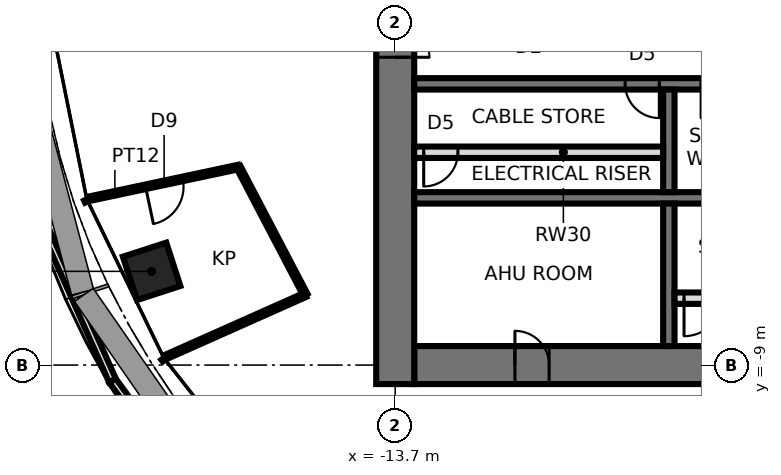
"""IFC4 building model, lengths in metres.
Left out: names, types, materials, properties, quantities, classifications, styles, units other than length and angle.
Written with IfcOpenShell. Run it as: python <this file> out.ifc"""

import sys

from ifc_helpers import new_model, si_unit, direction, frame, frame_2d, origin, origin_2d, place, context, subcontext, project, spatial, rectangle, extrude, element, fill, save


model = new_model("IFC4")
c1 = context("Model", 3, precision=1e-05, world=origin(), true_north=direction((0.0, 1.0)))
c2 = subcontext(c1, "Body", "Model", "MODEL_VIEW")
j1 = project(units=[si_unit("LENGTHUNIT", "METRE"), si_unit("PLANEANGLEUNIT", "RADIAN")], contexts=[c1])
p1 = place(None, origin())
s1 = spatial("IfcSite", under=j1, at=p1, CompositionType="ELEMENT")
p2 = place(p1, origin())
s2 = spatial("IfcBuilding", under=s1, at=p2, CompositionType="ELEMENT")
p3 = place(p2, frame((0.0, 0.0, 251.8)))
s3 = spatial("IfcBuildingStorey", under=s2, at=p3, CompositionType="ELEMENT", Elevation=251.8)
p4 = place(p3, frame((-20.109, -6.534, 0.0), z_axis=(0.0, 0.0, 1.0), x_axis=(-0.951056516295, -0.309016994375, 0.0)))
e1 = element("IfcColumn", 1, at=p4, inside=s3, PredefinedType="COLUMN", context=c2, shape_type="SweptSolid", body=[
    extrude(rectangle(XDim=1.2, YDim=1.2, at=origin_2d()), origin(), (0.0, 0.0, 1.0), 4.2),
])
p5 = place(p3, frame((-13.2, -9.0, 0.0), z_axis=(0.0, 0.0, 1.0), x_axis=(1.0, 0.0, 0.0)))
e2 = element("IfcWall", 2, at=p5, inside=s3, PredefinedType="SHEAR", context=c2, shape_type="SweptSolid", body=[
    extrude(rectangle(XDim=26.4, YDim=1.0, at=frame_2d((13.2, 0.0))), origin(), (0.0, 0.0, 1.0), 4.2),
])
p6 = place(p5, frame((2.65, 0.0, 0.0)))
e3 = element("IfcOpeningElement", 3, at=p6, cuts=e2, PredefinedType="OPENING", context=c2, shape_type="SweptSolid", body=[
    extrude(rectangle(XDim=0.9, YDim=2.1, at=frame_2d((0.45, 1.05))), frame((0.0, 0.51, 0.0), z_axis=(0.0, -1.0, 0.0), x_axis=(1.0, 0.0, 0.0)), (0.0, 0.0, 1.0), 1.02),
])
p7 = place(p5, frame((9.5, 0.0, 0.0)))
e4 = element("IfcOpeningElement", 4, at=p7, cuts=e2, PredefinedType="OPENING", context=c2, shape_type="SweptSolid", body=[
    extrude(rectangle(XDim=0.9, YDim=2.1, at=frame_2d((0.45, 1.05))), frame((0.0, 0.51, 0.0), z_axis=(0.0, -1.0, 0.0), x_axis=(1.0, 0.0, 0.0)), (0.0, 0.0, 1.0), 1.02),
])
p8 = place(p5, frame((16.0, 0.0, 0.0)))
e5 = element("IfcOpeningElement", 5, at=p8, cuts=e2, PredefinedType="OPENING", context=c2, shape_type="SweptSolid", body=[
    extrude(rectangle(XDim=0.9, YDim=2.1, at=frame_2d((0.45, 1.05))), frame((0.0, 0.51, 0.0), z_axis=(0.0, -1.0, 0.0), x_axis=(1.0, 0.0, 0.0)), (0.0, 0.0, 1.0), 1.02),
])
p9 = place(p5, frame((22.85, 0.0, 0.0)))
e6 = element("IfcOpeningElement", 6, at=p9, cuts=e2, PredefinedType="OPENING", context=c2, shape_type="SweptSolid", body=[
    extrude(rectangle(XDim=0.9, YDim=2.1, at=frame_2d((0.45, 1.05))), frame((0.0, 0.51, 0.0), z_axis=(0.0, -1.0, 0.0), x_axis=(1.0, 0.0, 0.0)), (0.0, 0.0, 1.0), 1.02),
])
p10 = place(p3, frame((-13.7, 9.5, 0.0), z_axis=(0.0, 0.0, 1.0), x_axis=(0.0, -1.0, 0.0)))
e7 = element("IfcWall", 7, at=p10, inside=s3, PredefinedType="SHEAR", context=c2, shape_type="SweptSolid", body=[
    extrude(rectangle(XDim=19.0, YDim=1.0, at=frame_2d((9.5, 0.0))), origin(), (0.0, 0.0, 1.0), 4.2),
])
p11 = place(p10, frame((8.6, 0.0, 0.0)))
e8 = element("IfcOpeningElement", 8, at=p11, cuts=e7, PredefinedType="OPENING", context=c2, shape_type="SweptSolid", body=[
    extrude(rectangle(XDim=1.8, YDim=2.4, at=frame_2d((0.9, 1.2))), frame((0.0, 0.51, 0.0), z_axis=(0.0, -1.0, 0.0), x_axis=(1.0, 0.0, 0.0)), (0.0, 0.0, 1.0), 1.02),
])
p12 = place(p3, frame((-13.2, -1.6, 0.0), z_axis=(0.0, 0.0, 1.0), x_axis=(1.0, 0.0, 0.0)))
e9 = element("IfcWall", 9, at=p12, inside=s3, PredefinedType="SHEAR", context=c2, shape_type="SweptSolid", body=[
    extrude(rectangle(XDim=26.4, YDim=0.3, at=frame_2d((13.2, 0.0))), origin(), (0.0, 0.0, 1.0), 4.2),
])
p13 = place(p12, frame((25.15, 0.0, 0.0)))
e10 = element("IfcOpeningElement", 10, at=p13, cuts=e9, PredefinedType="OPENING", context=c2, shape_type="SweptSolid", body=[
    extrude(rectangle(XDim=1.0, YDim=2.1, at=frame_2d((0.5, 1.05))), frame((0.0, 0.16, 0.0), z_axis=(0.0, -1.0, 0.0), x_axis=(1.0, 0.0, 0.0)), (0.0, 0.0, 1.0), 0.32),
])
p14 = place(p12, frame((7.55, 0.0, 0.0)))
e11 = element("IfcOpeningElement", 11, at=p14, cuts=e9, PredefinedType="OPENING", context=c2, shape_type="SweptSolid", body=[
    extrude(rectangle(XDim=0.9, YDim=2.1, at=frame_2d((0.45, 1.05))), frame((0.0, 0.16, 0.0), z_axis=(0.0, -1.0, 0.0), x_axis=(1.0, 0.0, 0.0)), (0.0, 0.0, 1.0), 0.32),
])
p15 = place(p12, frame((9.55, 0.0, 0.0)))
e12 = element("IfcOpeningElement", 12, at=p15, cuts=e9, PredefinedType="OPENING", context=c2, shape_type="SweptSolid", body=[
    extrude(rectangle(XDim=0.9, YDim=2.1, at=frame_2d((0.45, 1.05))), frame((0.0, 0.16, 0.0), z_axis=(0.0, -1.0, 0.0), x_axis=(1.0, 0.0, 0.0)), (0.0, 0.0, 1.0), 0.32),
])
p16 = place(p12, frame((12.15, 0.0, 0.0)))
e13 = element("IfcOpeningElement", 13, at=p16, cuts=e9, PredefinedType="OPENING", context=c2, shape_type="SweptSolid", body=[
    extrude(rectangle(XDim=0.9, YDim=2.1, at=frame_2d((0.45, 1.05))), frame((0.0, 0.16, 0.0), z_axis=(0.0, -1.0, 0.0), x_axis=(1.0, 0.0, 0.0)), (0.0, 0.0, 1.0), 0.32),
])
p17 = place(p12, frame((15.25, 0.0, 0.0)))
e14 = element("IfcOpeningElement", 14, at=p17, cuts=e9, PredefinedType="OPENING", context=c2, shape_type="SweptSolid", body=[
    extrude(rectangle(XDim=1.1, YDim=2.3, at=frame_2d((0.55, 1.15))), frame((0.0, 0.16, 0.0), z_axis=(0.0, -1.0, 0.0), x_axis=(1.0, 0.0, 0.0)), (0.0, 0.0, 1.0), 0.32),
])
p18 = place(p12, frame((17.85, 0.0, 0.0)))
e15 = element("IfcOpeningElement", 15, at=p18, cuts=e9, PredefinedType="OPENING", context=c2, shape_type="SweptSolid", body=[
    extrude(rectangle(XDim=1.1, YDim=2.3, at=frame_2d((0.55, 1.15))), frame((0.0, 0.16, 0.0), z_axis=(0.0, -1.0, 0.0), x_axis=(1.0, 0.0, 0.0)), (0.0, 0.0, 1.0), 0.32),
])
p19 = place(p12, frame((5.55, 0.0, 0.0)))
e16 = element("IfcOpeningElement", 16, at=p19, cuts=e9, PredefinedType="OPENING", context=c2, shape_type="SweptSolid", body=[
    extrude(rectangle(XDim=0.9, YDim=2.1, at=frame_2d((0.45, 1.05))), frame((0.0, 0.16, 0.0), z_axis=(0.0, -1.0, 0.0), x_axis=(1.0, 0.0, 0.0)), (0.0, 0.0, 1.0), 0.32),
])
p20 = place(p3, frame((-13.2, -4.6, 0.0), z_axis=(0.0, 0.0, 1.0), x_axis=(1.0, 0.0, 0.0)))
e17 = element("IfcWall", 17, at=p20, inside=s3, PredefinedType="SHEAR", context=c2, shape_type="SweptSolid", body=[
    extrude(rectangle(XDim=26.4, YDim=0.3, at=frame_2d((13.2, 0.0))), origin(), (0.0, 0.0, 1.0), 4.2),
])
p21 = place(p3, frame((-6.5, -1.75, 0.0), z_axis=(0.0, 0.0, 1.0), x_axis=(0.0, -1.0, 0.0)))
e18 = element("IfcWall", 18, at=p21, inside=s3, PredefinedType="SHEAR", context=c2, shape_type="SweptSolid", body=[
    extrude(rectangle(XDim=2.7, YDim=0.3, at=frame_2d((1.35, 0.0))), origin(), (0.0, 0.0, 1.0), 4.2),
])
p22 = place(p3, frame((-6.5, -4.75, 0.0), z_axis=(0.0, 0.0, 1.0), x_axis=(0.0, -1.0, 0.0)))
e19 = element("IfcWall", 19, at=p22, inside=s3, PredefinedType="SHEAR", context=c2, shape_type="SweptSolid", body=[
    extrude(rectangle(XDim=3.75, YDim=0.3, at=frame_2d((1.875, 0.0))), origin(), (0.0, 0.0, 1.0), 4.2),
])
p23 = place(p3, frame((-23.138, -4.918, 0.0), z_axis=(0.0, 0.0, 1.0), x_axis=(0.406654252218, -0.913582135964, 0.0)))
e20 = element("IfcWall", 20, at=p23, inside=s3, PredefinedType="PARAPET", context=c2, shape_type="SweptSolid", body=[
    extrude(rectangle(XDim=4.918, YDim=0.2, at=frame_2d((2.459, 0.0))), origin(), (0.0, 0.0, 1.0), 1.1),
])
p24 = place(p3, frame((-21.138, -9.411, 0.0), z_axis=(0.0, 0.0, 1.0), x_axis=(0.590318108824, -0.807170694708, 0.0)))
e21 = element("IfcWall", 21, at=p24, inside=s3, PredefinedType="PARAPET", context=c2, shape_type="SweptSolid", body=[
    extrude(rectangle(XDim=4.811, YDim=0.2, at=frame_2d((2.405, 0.0))), origin(), (0.0, 0.0, 1.0), 1.1),
])
p25 = place(p3, frame((-6.35, -7.24, 0.0), z_axis=(0.0, 0.0, 1.0), x_axis=(1.0, 0.0, 0.0)))
e22 = element("IfcWall", 22, at=p25, inside=s3, PredefinedType="PARTITIONING", context=c2, shape_type="SweptSolid", body=[
    extrude(rectangle(XDim=6.2, YDim=0.3, at=frame_2d((3.1, 0.0))), origin(), (0.0, 0.0, 1.0), 4.04),
])
p26 = place(p25, frame((0.25, 0.0, 0.0)))
e23 = element("IfcOpeningElement", 23, at=p26, cuts=e22, PredefinedType="OPENING", context=c2, shape_type="SweptSolid", body=[
    extrude(rectangle(XDim=1.0, YDim=2.4, at=frame_2d((0.5, 1.2))), frame((0.0, 0.16, 0.0), z_axis=(0.0, -1.0, 0.0), x_axis=(1.0, 0.0, 0.0)), (0.0, 0.0, 1.0), 0.32),
])
p27 = place(p3, frame((-13.2, -3.4, 0.0), z_axis=(0.0, 0.0, 1.0), x_axis=(1.0, 0.0, 0.0)))
e24 = element("IfcWall", 24, at=p27, inside=s3, PredefinedType="SOLIDWALL", context=c2, shape_type="SweptSolid", body=[
    extrude(rectangle(XDim=6.55, YDim=0.3, at=frame_2d((3.275, 0.0))), origin(), (0.0, 0.0, 1.0), 4.04),
])
p28 = place(p27, frame((0.25, 0.0, 0.0)))
e25 = element("IfcOpeningElement", 25, at=p28, cuts=e24, PredefinedType="OPENING", context=c2, shape_type="SweptSolid", body=[
    extrude(rectangle(XDim=0.9, YDim=2.1, at=frame_2d((0.45, 1.05))), frame((0.0, 0.16, 0.0), z_axis=(0.0, -1.0, 0.0), x_axis=(1.0, 0.0, 0.0)), (0.0, 0.0, 1.0), 0.32),
])
p29 = place(p3, frame((-17.824, -3.789, 0.0), z_axis=(0.0, 0.0, 1.0), x_axis=(-0.978140543132, -0.207944891454, 0.0)))
e26 = element("IfcWall", 26, at=p29, inside=s3, PredefinedType="PARTITIONING", context=c2, shape_type="SweptSolid", body=[
    extrude(rectangle(XDim=4.0, YDim=0.12, at=frame_2d((2.0, 0.0))), origin(), (0.0, 0.0, 1.0), 4.04),
])
p30 = place(p29, frame((1.5, 0.0, 0.0)))
e27 = element("IfcOpeningElement", 27, at=p30, cuts=e26, PredefinedType="OPENING", context=c2, shape_type="SweptSolid", body=[
    extrude(rectangle(XDim=1.0, YDim=2.4, at=frame_2d((0.5, 1.2))), frame((0.0, 0.07, 0.0), z_axis=(0.0, -1.0, 0.0), x_axis=(1.0, 0.0, 0.0)), (0.0, 0.0, 1.0), 0.14),
])
p31 = place(p3, frame((-16.062, -7.152, 0.0), z_axis=(0.0, 0.0, 1.0), x_axis=(-0.464033426365, 0.885817689604, 0.0)))
e28 = element("IfcWall", 28, at=p31, inside=s3, PredefinedType="PARTITIONING", context=c2, shape_type="SweptSolid", body=[
    extrude(rectangle(XDim=3.797, YDim=0.12, at=frame_2d((1.898, 0.0))), origin(), (0.0, 0.0, 1.0), 4.04),
])
p32 = place(p3, frame((-19.717, -8.778, 0.0), z_axis=(0.0, 0.0, 1.0), x_axis=(0.913572283964, 0.406676384824, 0.0)))
e29 = element("IfcWall", 29, at=p32, inside=s3, PredefinedType="PARTITIONING", context=c2, shape_type="SweptSolid", body=[
    extrude(rectangle(XDim=4.0, YDim=0.12, at=frame_2d((2.0, 0.0))), origin(), (0.0, 0.0, 1.0), 4.04),
])
p33 = place(p11, origin())
e30 = element("IfcDoor", 30, at=p33, inside=s3, OperationType="DOUBLE_DOOR_SINGLE_SWING", PredefinedType="DOOR", context=c2, shape_type="SweptSolid", body=[
    extrude(rectangle(XDim=1.72, YDim=2.36, at=frame_2d((0.9, 1.18))), frame((0.0, 0.025, 0.0), z_axis=(0.0, -1.0, 0.0), x_axis=(1.0, 0.0, 0.0)), (0.0, 0.0, 1.0), 0.05),
    extrude(rectangle(XDim=0.04, YDim=2.4, at=frame_2d((0.02, 1.2))), frame((0.0, 0.25, 0.0), z_axis=(0.0, -1.0, 0.0), x_axis=(1.0, 0.0, 0.0)), (0.0, 0.0, 1.0), 0.5),
    extrude(rectangle(XDim=0.04, YDim=2.4, at=frame_2d((1.78, 1.2))), frame((0.0, 0.25, 0.0), z_axis=(0.0, -1.0, 0.0), x_axis=(1.0, 0.0, 0.0)), (0.0, 0.0, 1.0), 0.5),
    extrude(rectangle(XDim=1.72, YDim=0.04, at=frame_2d((0.9, 2.38))), frame((0.0, 0.25, 0.0), z_axis=(0.0, -1.0, 0.0), x_axis=(1.0, 0.0, 0.0)), (0.0, 0.0, 1.0), 0.5),
])
fill(e8, e30)
p34 = place(p19, frame((0.9, 0.0, 0.0), z_axis=(0.0, 0.0, 1.0), x_axis=(-1.0, 0.0, 0.0)))
e31 = element("IfcDoor", 31, at=p34, inside=s3, OperationType="SINGLE_SWING_LEFT", PredefinedType="DOOR", context=c2, shape_type="SweptSolid", body=[
    extrude(rectangle(XDim=0.9, YDim=2.1, at=frame_2d((0.45, 1.05))), frame((0.0, 0.025, 0.0), z_axis=(0.0, -1.0, 0.0), x_axis=(1.0, 0.0, 0.0)), (0.0, 0.0, 1.0), 0.05),
])
fill(e16, e31)
p35 = place(p6, origin())
e32 = element("IfcDoor", 32, at=p35, inside=s3, OperationType="SINGLE_SWING_LEFT", PredefinedType="DOOR", context=c2, shape_type="SweptSolid", body=[
    extrude(rectangle(XDim=0.82, YDim=2.06, at=frame_2d((0.45, 1.03))), frame((0.0, 0.025, 0.0), z_axis=(0.0, -1.0, 0.0), x_axis=(1.0, 0.0, 0.0)), (0.0, 0.0, 1.0), 0.05),
    extrude(rectangle(XDim=0.04, YDim=2.1, at=frame_2d((0.02, 1.05))), frame((0.0, 0.25, 0.0), z_axis=(0.0, -1.0, 0.0), x_axis=(1.0, 0.0, 0.0)), (0.0, 0.0, 1.0), 0.5),
    extrude(rectangle(XDim=0.04, YDim=2.1, at=frame_2d((0.88, 1.05))), frame((0.0, 0.25, 0.0), z_axis=(0.0, -1.0, 0.0), x_axis=(1.0, 0.0, 0.0)), (0.0, 0.0, 1.0), 0.5),
    extrude(rectangle(XDim=0.82, YDim=0.04, at=frame_2d((0.45, 2.08))), frame((0.0, 0.25, 0.0), z_axis=(0.0, -1.0, 0.0), x_axis=(1.0, 0.0, 0.0)), (0.0, 0.0, 1.0), 0.5),
])
fill(e3, e32)
p36 = place(p26, frame((1.0, 0.0, 0.0), z_axis=(0.0, 0.0, 1.0), x_axis=(-1.0, 0.0, 0.0)))
e33 = element("IfcDoor", 33, at=p36, inside=s3, OperationType="SINGLE_SWING_RIGHT", PredefinedType="DOOR", context=c2, shape_type="SweptSolid", body=[
    extrude(rectangle(XDim=1.0, YDim=2.4, at=frame_2d((0.5, 1.2))), frame((0.0, 0.025, 0.0), z_axis=(0.0, -1.0, 0.0), x_axis=(1.0, 0.0, 0.0)), (0.0, 0.0, 1.0), 0.05),
])
fill(e23, e33)
p37 = place(p28, frame((0.9, 0.0, 0.0), z_axis=(0.0, 0.0, 1.0), x_axis=(-1.0, 0.0, 0.0)))
e34 = element("IfcDoor", 34, at=p37, inside=s3, OperationType="SINGLE_SWING_RIGHT", PredefinedType="DOOR", context=c2, shape_type="SweptSolid", body=[
    extrude(rectangle(XDim=0.9, YDim=2.1, at=frame_2d((0.45, 1.05))), frame((0.0, 0.025, 0.0), z_axis=(0.0, -1.0, 0.0), x_axis=(1.0, 0.0, 0.0)), (0.0, 0.0, 1.0), 0.05),
])
fill(e25, e34)
p38 = place(p30, origin())
e35 = element("IfcDoor", 35, at=p38, inside=s3, OperationType="SINGLE_SWING_RIGHT", PredefinedType="DOOR", context=c2, shape_type="SweptSolid", body=[
    extrude(rectangle(XDim=1.0, YDim=2.4, at=frame_2d((0.5, 1.2))), frame((0.0, 0.025, 0.0), z_axis=(0.0, -1.0, 0.0), x_axis=(1.0, 0.0, 0.0)), (0.0, 0.0, 1.0), 0.05),
])
fill(e27, e35)
save(model, sys.argv[1])
